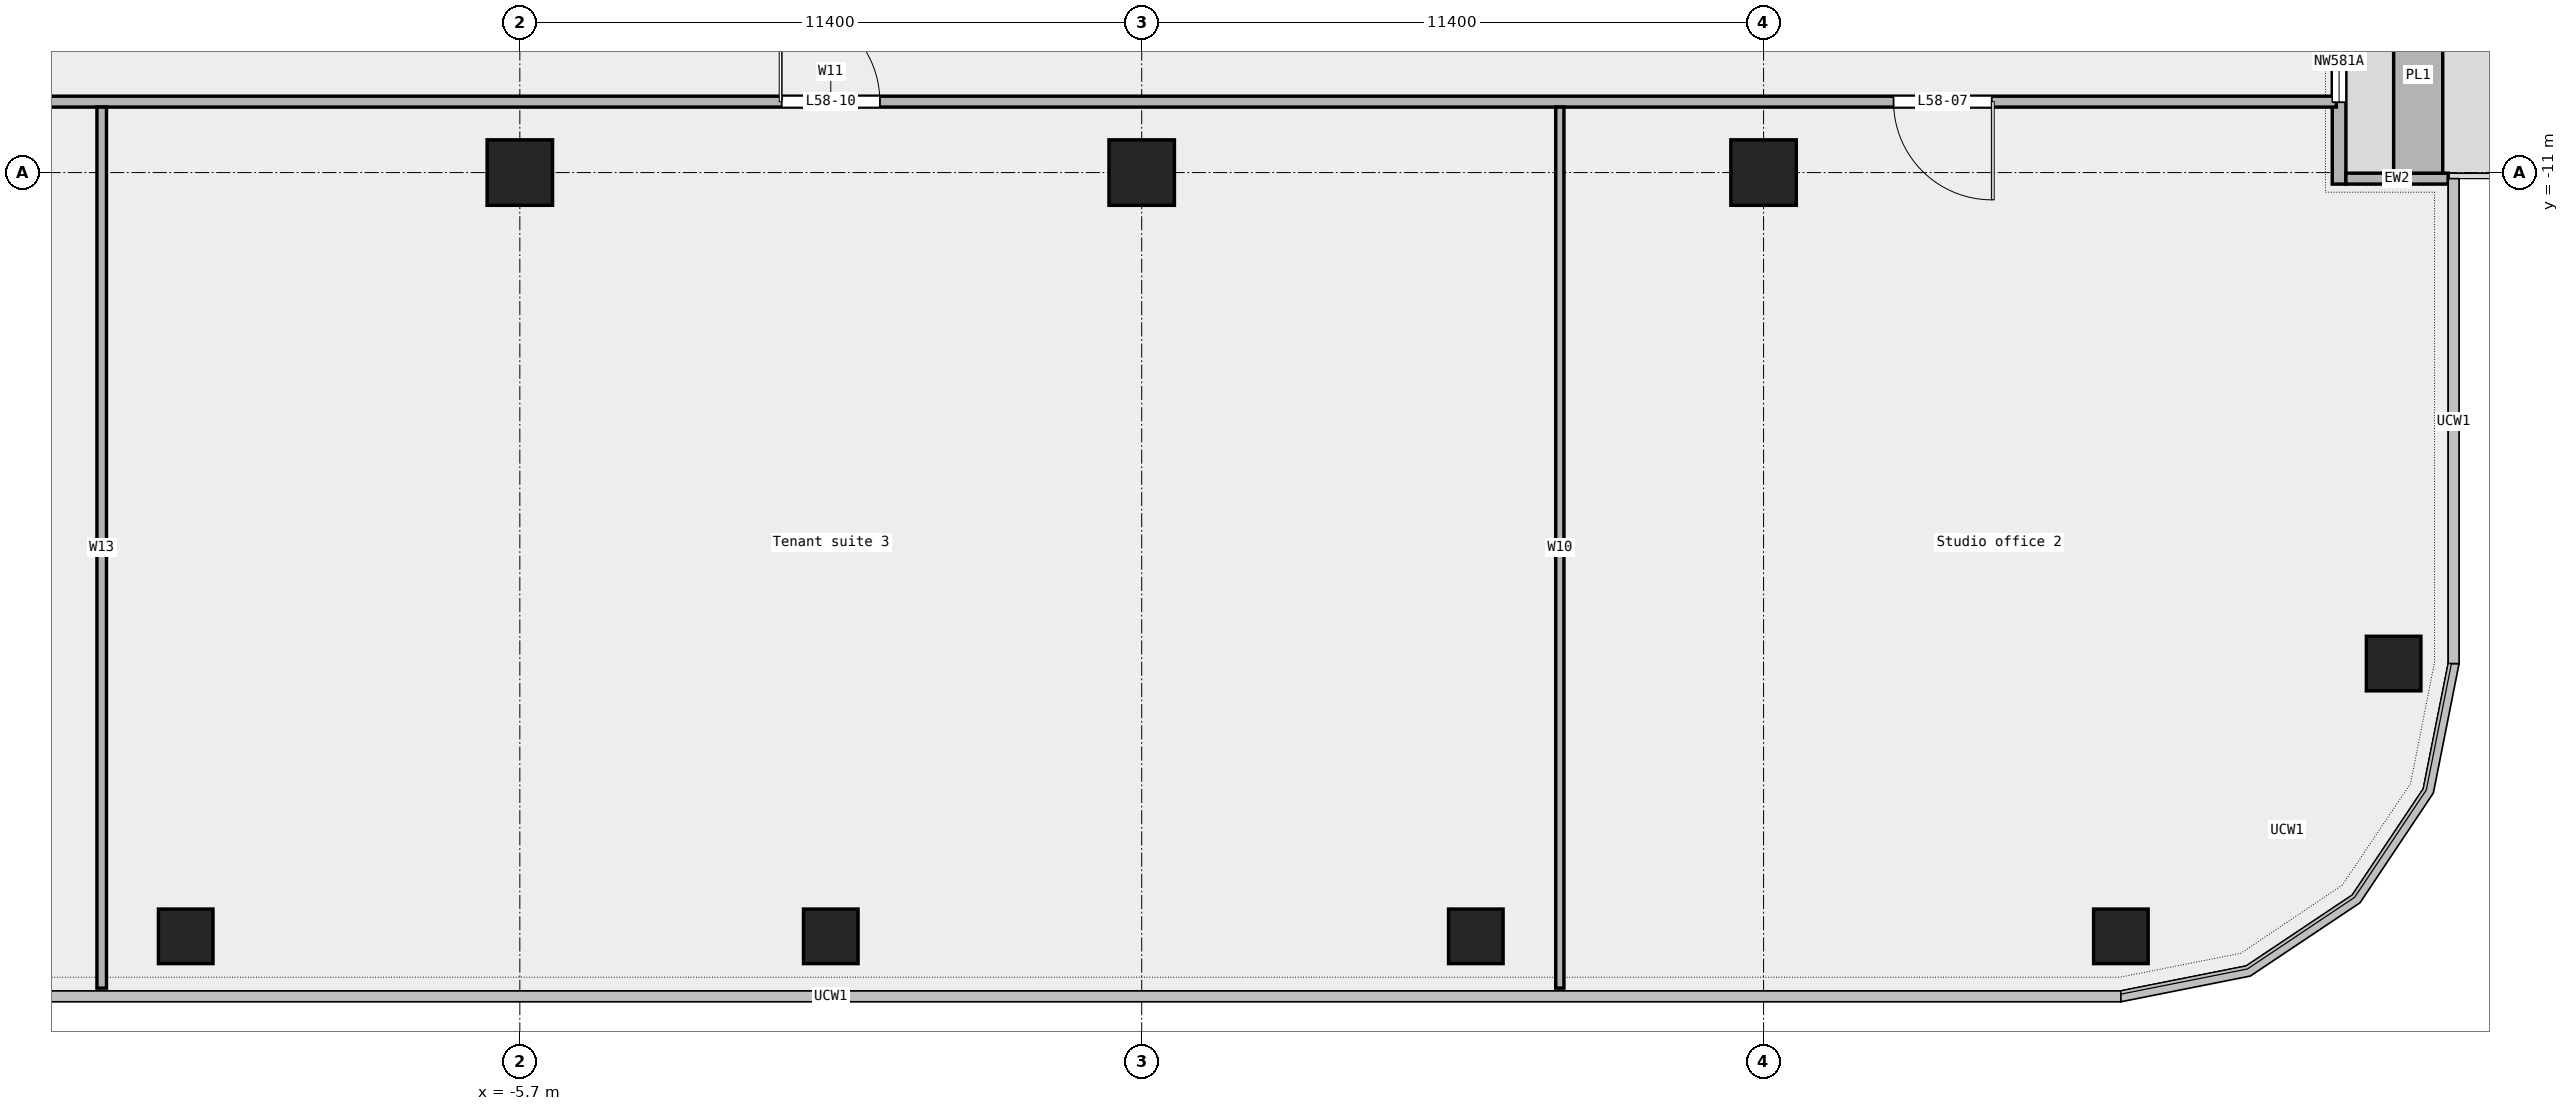
"""IFC4 building model, lengths in metres.
Left out: names, types, materials, properties, quantities, classifications, styles, units other than length and angle.
Written with IfcOpenShell. Run it as: python <this file> out.ifc"""

import sys

from ifc_helpers import new_model, si_unit, direction, frame, frame_2d, origin, origin_2d, place, context, subcontext, project, spatial, rectangle, extrude, element, fill, save


model = new_model("IFC4")
c1 = context("Model", 3, precision=1e-05, world=origin(), true_north=direction((0.0, 1.0)))
c2 = subcontext(c1, "Body", "Model", "MODEL_VIEW")
j1 = project(units=[si_unit("LENGTHUNIT", "METRE"), si_unit("PLANEANGLEUNIT", "RADIAN")], contexts=[c1])
p1 = place(None, origin())
s1 = spatial("IfcSite", under=j1, at=p1, CompositionType="ELEMENT")
p2 = place(p1, origin())
s2 = spatial("IfcBuilding", under=s1, at=p2, CompositionType="ELEMENT")
p3 = place(p2, frame((0.0, 0.0, 271.4)))
s3 = spatial("IfcBuildingStorey", under=s2, at=p3, CompositionType="ELEMENT", Elevation=271.4)
for number, where, z_axis, x_axis in (
    (1, (-11.825, -25.0, 0.0), (0.0, 0.0, 1.0), (1.0, 0.0, 0.0)),
    (2, (0.0, -25.0, 0.0), (0.0, 0.0, 1.0), (1.0, 0.0, 0.0)),
    (3, (11.825, -25.0, 0.0), (0.0, 0.0, 1.0), (1.0, 0.0, 0.0)),
    (4, (23.65, -25.0, 0.0), (0.0, 0.0, 1.0), (1.0, 0.0, 0.0)),
    (5, (28.65, -20.0, 0.0), (0.0, 0.0, 1.0), (1.0, 0.0, 0.0)),
):
    element("IfcColumn", number, at=place(p3, frame(where, z_axis=z_axis, x_axis=x_axis)), inside=s3, PredefinedType="COLUMN", context=c2, shape_type="SweptSolid", body=[
        extrude(rectangle(XDim=1.0, YDim=1.0, at=origin_2d()), origin(), (0.0, 0.0, 1.0), 3.6),
    ])
for number, where, z_axis, x_axis in (
    (6, (-5.7, -11.0, 0.0), (0.0, 0.0, 1.0), (1.0, 0.0, 0.0)),
    (7, (5.7, -11.0, 0.0), (0.0, 0.0, 1.0), (1.0, 0.0, 0.0)),
    (8, (17.1, -11.0, 0.0), (0.0, 0.0, 1.0), (1.0, 0.0, 0.0)),
):
    element("IfcColumn", number, at=place(p3, frame(where, z_axis=z_axis, x_axis=x_axis)), inside=s3, PredefinedType="COLUMN", context=c2, shape_type="SweptSolid", body=[
        extrude(rectangle(XDim=1.2, YDim=1.2, at=origin_2d()), origin(), (0.0, 0.0, 1.0), 3.6),
    ])
p4 = place(p3, frame((27.65, -11.211, 0.0), z_axis=(0.0, 0.0, 1.0), x_axis=(0.0, 1.0, 0.0)))
e9 = element("IfcWall", 9, at=p4, inside=s3, PredefinedType="STANDARD", context=c2, shape_type="SweptSolid", body=[
    extrude(rectangle(XDim=13.533, YDim=0.25, at=frame_2d((6.767, 0.0))), origin(), (0.0, 0.0, 1.0), 3.6),
])
p5 = place(p4, frame((1.5, 0.0, 0.45)))
e10 = element("IfcOpeningElement", 10, at=p5, cuts=e9, PredefinedType="OPENING", context=c2, shape_type="SweptSolid", body=[
    extrude(rectangle(XDim=1.5, YDim=2.4, at=frame_2d((0.75, 1.2))), frame((0.0, 0.137, 0.0), z_axis=(0.0, -1.0, 0.0), x_axis=(1.0, 0.0, 0.0)), (0.0, 0.0, 1.0), 0.274),
])
p6 = place(p4, frame((5.75, 0.0, 0.0)))
e11 = element("IfcOpeningElement", 11, at=p6, cuts=e9, PredefinedType="OPENING", context=c2, shape_type="SweptSolid", body=[
    extrude(rectangle(XDim=1.8, YDim=2.4, at=frame_2d((0.9, 1.2))), frame((0.0, 0.137, 0.0), z_axis=(0.0, -1.0, 0.0), x_axis=(1.0, 0.0, 0.0)), (0.0, 0.0, 1.0), 0.274),
])
p7 = place(p4, frame((10.5, 0.0, 0.45)))
e12 = element("IfcOpeningElement", 12, at=p7, cuts=e9, PredefinedType="OPENING", context=c2, shape_type="SweptSolid", body=[
    extrude(rectangle(XDim=1.5, YDim=2.4, at=frame_2d((0.75, 1.2))), frame((0.0, 0.137, 0.0), z_axis=(0.0, -1.0, 0.0), x_axis=(1.0, 0.0, 0.0)), (0.0, 0.0, 1.0), 0.274),
])
p8 = place(p3, frame((29.65, -11.111, 0.0), z_axis=(0.0, 0.0, 1.0), x_axis=(-1.0, 0.0, 0.0)))
e13 = element("IfcWall", 13, at=p8, inside=s3, PredefinedType="STANDARD", context=c2, shape_type="SweptSolid", body=[
    extrude(rectangle(XDim=1.875, YDim=0.2, at=frame_2d((0.938, 0.0))), origin(), (0.0, 0.0, 1.0), 3.6),
])
p9 = place(p3, frame((29.1, -11.011, 0.0), z_axis=(0.0, 0.0, 1.0), x_axis=(0.0, 1.0, 0.0)))
e14 = element("IfcWall", 14, at=p9, inside=s3, PredefinedType="STANDARD", context=c2, shape_type="SweptSolid", body=[
    extrude(rectangle(XDim=3.6, YDim=0.9, at=frame_2d((1.8, 0.0))), origin(), (0.0, 0.0, 1.0), 0.7),
])
p10 = place(p3, frame((-27.6, -9.7, 0.0), z_axis=(0.0, 0.0, 1.0), x_axis=(1.0, 0.0, 0.0)))
e15 = element("IfcWall", 15, at=p10, inside=s3, PredefinedType="PARTITIONING", context=c2, shape_type="SweptSolid", body=[
    extrude(rectangle(XDim=55.2, YDim=0.2, at=frame_2d((27.6, 0.0))), origin(), (0.0, 0.0, 1.0), 3.6),
])
p11 = place(p10, frame((47.083, 0.0, 0.0)))
e16 = element("IfcOpeningElement", 16, at=p11, cuts=e15, PredefinedType="OPENING", context=c2, shape_type="SweptSolid", body=[
    extrude(rectangle(XDim=1.8, YDim=2.1, at=frame_2d((0.9, 1.05))), frame((0.0, 0.112, 0.0), z_axis=(0.0, -1.0, 0.0), x_axis=(1.0, 0.0, 0.0)), (0.0, 0.0, 1.0), 0.224),
])
p12 = place(p10, frame((26.7, 0.0, 0.0)))
e17 = element("IfcOpeningElement", 17, at=p12, cuts=e15, PredefinedType="OPENING", context=c2, shape_type="SweptSolid", body=[
    extrude(rectangle(XDim=1.8, YDim=2.1, at=frame_2d((0.9, 1.05))), frame((0.0, 0.112, 0.0), z_axis=(0.0, -1.0, 0.0), x_axis=(1.0, 0.0, 0.0)), (0.0, 0.0, 1.0), 0.224),
])
p13 = place(p10, frame((6.317, 0.0, 0.0)))
e18 = element("IfcOpeningElement", 18, at=p13, cuts=e15, PredefinedType="OPENING", context=c2, shape_type="SweptSolid", body=[
    extrude(rectangle(XDim=1.8, YDim=2.1, at=frame_2d((0.9, 1.05))), frame((0.0, 0.112, 0.0), z_axis=(0.0, -1.0, 0.0), x_axis=(1.0, 0.0, 0.0)), (0.0, 0.0, 1.0), 0.224),
])
p14 = place(p3, frame((-13.365, -25.95, 0.0), z_axis=(0.0, 0.0, 1.0), x_axis=(0.0, 1.0, 0.0)))
e19 = element("IfcWall", 19, at=p14, inside=s3, PredefinedType="PARTITIONING", context=c2, shape_type="SweptSolid", body=[
    extrude(rectangle(XDim=16.15, YDim=0.175, at=frame_2d((8.075, 0.0))), origin(), (0.0, 0.0, 1.0), 3.6),
])
p15 = place(p3, frame((13.365, -25.95, 0.0), z_axis=(0.0, 0.0, 1.0), x_axis=(0.0, 1.0, 0.0)))
e20 = element("IfcWall", 20, at=p15, inside=s3, PredefinedType="PARTITIONING", context=c2, shape_type="SweptSolid", body=[
    extrude(rectangle(XDim=16.15, YDim=0.15, at=frame_2d((8.075, 0.0))), origin(), (0.0, 0.0, 1.0), 3.6),
])
p16 = place(p5, origin())
e21 = element("IfcWindow", 21, at=p16, inside=s3, PartitioningType="SINGLE_PANEL", PredefinedType="WINDOW", context=c2, shape_type="SweptSolid", body=[
    extrude(rectangle(XDim=1.5, YDim=2.4, at=frame_2d((0.75, 1.2))), frame((0.0, 0.03, 0.0), z_axis=(0.0, -1.0, 0.0), x_axis=(1.0, 0.0, 0.0)), (0.0, 0.0, 1.0), 0.06),
])
fill(e10, e21)
p17 = place(p11, origin())
e22 = element("IfcDoor", 22, at=p17, inside=s3, OperationType="DOUBLE_DOOR_SINGLE_SWING", PredefinedType="DOOR", context=c2, shape_type="SweptSolid", body=[
    extrude(rectangle(XDim=1.8, YDim=2.1, at=frame_2d((0.9, 1.05))), frame((0.0, 0.025, 0.0), z_axis=(0.0, -1.0, 0.0), x_axis=(1.0, 0.0, 0.0)), (0.0, 0.0, 1.0), 0.05),
])
fill(e16, e22)
p18 = place(p12, origin())
e23 = element("IfcDoor", 23, at=p18, inside=s3, OperationType="DOUBLE_DOOR_SINGLE_SWING", PredefinedType="DOOR", context=c2, shape_type="SweptSolid", body=[
    extrude(rectangle(XDim=1.8, YDim=2.1, at=frame_2d((0.9, 1.05))), frame((0.0, 0.025, 0.0), z_axis=(0.0, -1.0, 0.0), x_axis=(1.0, 0.0, 0.0)), (0.0, 0.0, 1.0), 0.05),
])
fill(e17, e23)
save(model, sys.argv[1])
